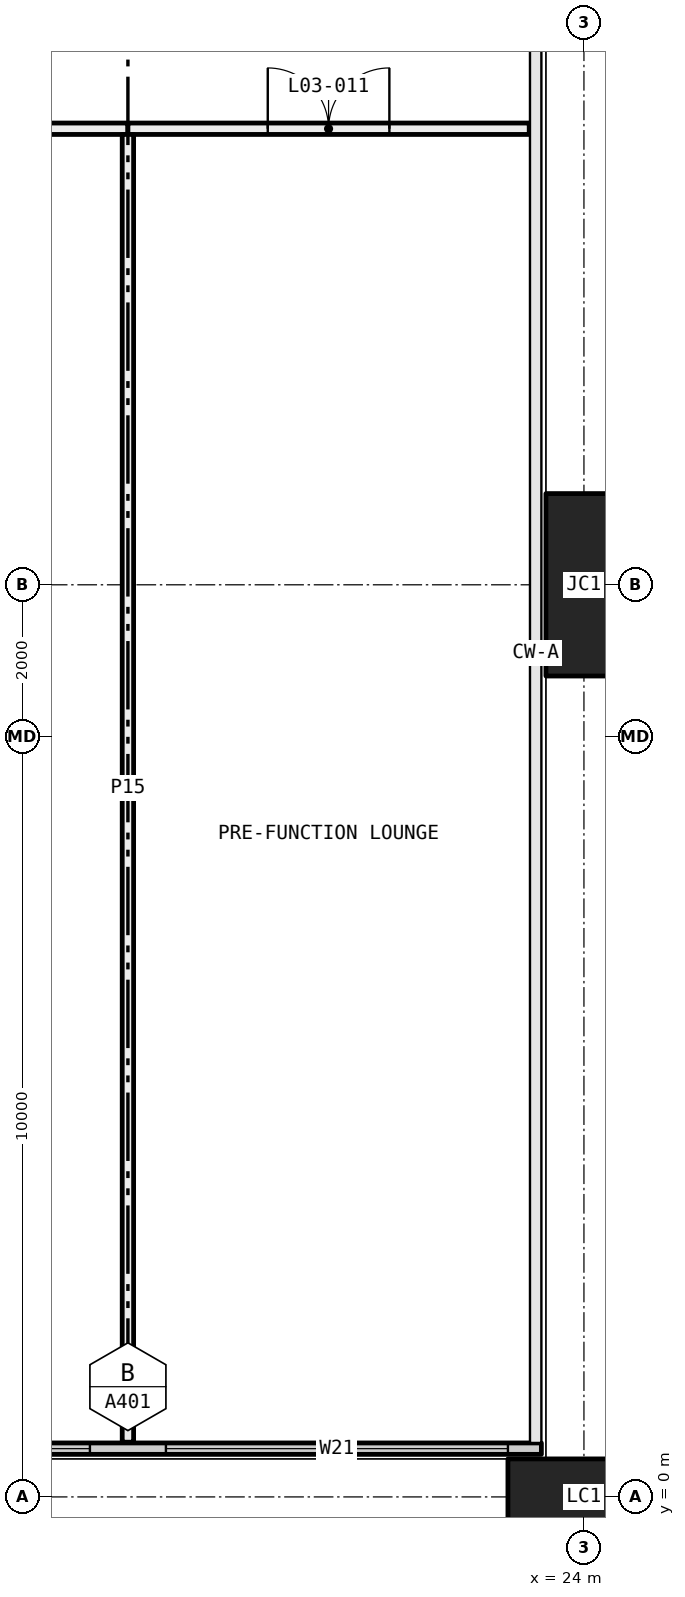
"""IFC4 building model, lengths in metres.
Left out: names, types, materials, properties, quantities, classifications, styles, units other than length and angle.
Written with IfcOpenShell. Run it as: python <this file> out.ifc"""

import sys

from ifc_helpers import new_model, si_unit, direction, frame, frame_2d, origin, origin_2d, place, context, subcontext, project, spatial, rectangle, hollow_rectangle, extrude, element, fill, save


model = new_model("IFC4")
c1 = context("Model", 3, precision=1e-05, world=origin(), true_north=direction((0.0, 1.0)))
c2 = subcontext(c1, "Body", "Model", "MODEL_VIEW")
j1 = project(units=[si_unit("LENGTHUNIT", "METRE"), si_unit("PLANEANGLEUNIT", "RADIAN")], contexts=[c1])
p1 = place(None, origin())
s1 = spatial("IfcSite", under=j1, at=p1, CompositionType="ELEMENT")
p2 = place(p1, origin())
s2 = spatial("IfcBuilding", under=s1, at=p2, CompositionType="ELEMENT")
p3 = place(p2, frame((0.0, 0.0, 18.0)))
s3 = spatial("IfcBuildingStorey", under=s2, at=p3, CompositionType="ELEMENT", Elevation=18.0)
p4 = place(p3, frame((24.0, 0.0, -0.4), z_axis=(0.0, 0.0, 1.0), x_axis=(1.0, 0.0, 0.0)))
e1 = element("IfcColumn", 1, at=p4, inside=s3, PredefinedType="COLUMN", context=c2, shape_type="SweptSolid", body=[
    extrude(hollow_rectangle(XDim=2.0, YDim=1.0, WallThickness=0.08, at=origin_2d()), origin(), (0.0, 0.0, 1.0), 6.0),
])
p5 = place(p3, frame((24.0, 12.0, -0.4), z_axis=(0.0, 0.0, 1.0), x_axis=(0.0, 1.0, 0.0)))
e2 = element("IfcColumn", 2, at=p5, inside=s3, PredefinedType="COLUMN", context=c2, shape_type="SweptSolid", body=[
    extrude(hollow_rectangle(XDim=2.4, YDim=1.0, WallThickness=0.09, at=origin_2d()), origin(), (0.0, 0.0, 1.0), 6.0),
])
p6 = place(p3, frame((6.56, 0.635, 0.0), z_axis=(0.0, 0.0, 1.0), x_axis=(1.0, 0.0, 0.0)))
e3 = element("IfcWall", 3, at=p6, inside=s3, PredefinedType="ELEMENTEDWALL", context=c2, shape_type="SweptSolid", body=[
    extrude(rectangle(XDim=16.88, YDim=0.15, at=frame_2d((8.44, 0.0))), origin(), (0.0, 0.0, 1.0), 5.6),
])
p7 = place(p6, frame((0.44, 0.0, 0.45)))
e4 = element("IfcOpeningElement", 4, at=p7, cuts=e3, PredefinedType="OPENING", context=c2, shape_type="SweptSolid", body=[
    extrude(rectangle(XDim=4.5, YDim=5.1, at=frame_2d((2.25, 2.55))), frame((0.0, 0.085, 0.0), z_axis=(0.0, -1.0, 0.0), x_axis=(1.0, 0.0, 0.0)), (0.0, 0.0, 1.0), 0.17),
])
p8 = place(p6, frame((5.94, 0.0, 0.45)))
e5 = element("IfcOpeningElement", 5, at=p8, cuts=e3, PredefinedType="OPENING", context=c2, shape_type="SweptSolid", body=[
    extrude(rectangle(XDim=5.0, YDim=5.1, at=frame_2d((2.5, 2.55))), frame((0.0, 0.085, 0.0), z_axis=(0.0, -1.0, 0.0), x_axis=(1.0, 0.0, 0.0)), (0.0, 0.0, 1.0), 0.17),
])
p9 = place(p6, frame((11.94, 0.0, 0.45)))
e6 = element("IfcOpeningElement", 6, at=p9, cuts=e3, PredefinedType="OPENING", context=c2, shape_type="SweptSolid", body=[
    extrude(rectangle(XDim=4.5, YDim=5.1, at=frame_2d((2.25, 2.55))), frame((0.0, 0.085, 0.0), z_axis=(0.0, -1.0, 0.0), x_axis=(1.0, 0.0, 0.0)), (0.0, 0.0, 1.0), 0.17),
])
p10 = place(p3, frame((9.0, 18.0, 0.0), z_axis=(0.0, 0.0, 1.0), x_axis=(1.0, 0.0, 0.0)))
e7 = element("IfcWall", 7, at=p10, inside=s3, PredefinedType="PARTITIONING", context=c2, shape_type="SweptSolid", body=[
    extrude(rectangle(XDim=9.0, YDim=0.15, at=frame_2d((4.5, 0.0))), origin(), (0.0, 0.0, 1.0), 5.6),
])
p11 = place(p10, frame((3.7, 0.0, 0.0)))
e8 = element("IfcOpeningElement", 8, at=p11, cuts=e7, PredefinedType="OPENING", context=c2, shape_type="SweptSolid", body=[
    extrude(rectangle(XDim=1.6, YDim=2.1, at=frame_2d((0.8, 1.05))), frame((0.0, 0.085, 0.0), z_axis=(0.0, -1.0, 0.0), x_axis=(1.0, 0.0, 0.0)), (0.0, 0.0, 1.0), 0.17),
])
p12 = place(p3, frame((18.0, 18.0, 0.0), z_axis=(0.0, 0.0, 1.0), x_axis=(1.0, 0.0, 0.0)))
e9 = element("IfcWall", 9, at=p12, inside=s3, PredefinedType="PARTITIONING", context=c2, shape_type="SweptSolid", body=[
    extrude(rectangle(XDim=5.28, YDim=0.15, at=frame_2d((2.64, 0.0))), origin(), (0.0, 0.0, 1.0), 5.6),
])
p13 = place(p12, frame((1.84, 0.0, 0.0)))
e10 = element("IfcOpeningElement", 10, at=p13, cuts=e9, PredefinedType="OPENING", context=c2, shape_type="SweptSolid", body=[
    extrude(rectangle(XDim=1.6, YDim=2.1, at=frame_2d((0.8, 1.05))), frame((0.0, 0.085, 0.0), z_axis=(0.0, -1.0, 0.0), x_axis=(1.0, 0.0, 0.0)), (0.0, 0.0, 1.0), 0.17),
])
p14 = place(p3, frame((18.0, 0.72, 0.0), z_axis=(0.0, 0.0, 1.0), x_axis=(0.0, 1.0, 0.0)))
e11 = element("IfcWall", 11, at=p14, inside=s3, PredefinedType="PARTITIONING", context=c2, shape_type="SweptSolid", body=[
    extrude(rectangle(XDim=17.205, YDim=0.15, at=frame_2d((8.603, 0.0))), origin(), (0.0, 0.0, 1.0), 5.6),
])
p15 = place(p8, origin())
e12 = element("IfcWindow", 12, at=p15, inside=s3, PartitioningType="SINGLE_PANEL", PredefinedType="WINDOW", context=c2, shape_type="SweptSolid", body=[
    extrude(rectangle(XDim=5.0, YDim=5.1, at=frame_2d((2.5, 2.55))), frame((0.0, 0.03, 0.0), z_axis=(0.0, -1.0, 0.0), x_axis=(1.0, 0.0, 0.0)), (0.0, 0.0, 1.0), 0.06),
])
fill(e5, e12)
p16 = place(p9, origin())
e13 = element("IfcWindow", 13, at=p16, inside=s3, PartitioningType="SINGLE_PANEL", PredefinedType="WINDOW", context=c2, shape_type="SweptSolid", body=[
    extrude(rectangle(XDim=4.5, YDim=5.1, at=frame_2d((2.25, 2.55))), frame((0.0, 0.03, 0.0), z_axis=(0.0, -1.0, 0.0), x_axis=(1.0, 0.0, 0.0)), (0.0, 0.0, 1.0), 0.06),
])
fill(e6, e13)
p17 = place(p13, origin())
e14 = element("IfcDoor", 14, at=p17, inside=s3, OperationType="DOUBLE_DOOR_SINGLE_SWING", PredefinedType="DOOR", context=c2, shape_type="SweptSolid", body=[
    extrude(rectangle(XDim=1.6, YDim=2.1, at=frame_2d((0.8, 1.05))), frame((0.0, 0.025, 0.0), z_axis=(0.0, -1.0, 0.0), x_axis=(1.0, 0.0, 0.0)), (0.0, 0.0, 1.0), 0.05),
])
fill(e10, e14)
save(model, sys.argv[1])
